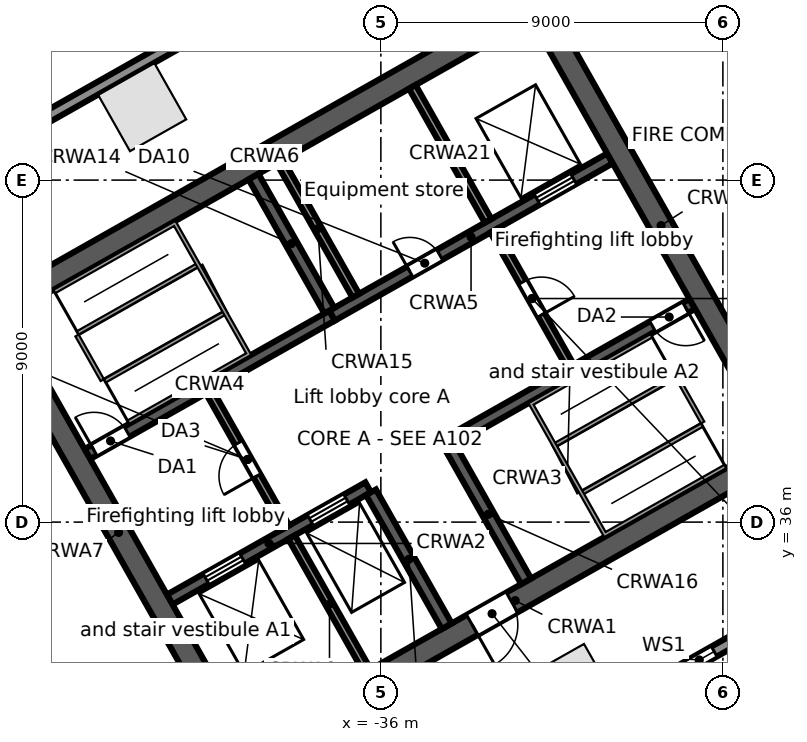
"""IFC4 building model, lengths in metres.
Left out: names, types, materials, properties, quantities, classifications, styles, units other than length and angle.
Written with IfcOpenShell. Run it as: python <this file> out.ifc"""

import sys

from ifc_helpers import new_model, si_unit, direction, frame, frame_2d, origin, origin_2d, place, context, subcontext, project, spatial, rectangle, extrude, element, fill, save


model = new_model("IFC4")
c1 = context("Model", 3, precision=1e-05, world=origin(), true_north=direction((0.0, 1.0)))
c2 = subcontext(c1, "Body", "Model", "MODEL_VIEW")
j1 = project(units=[si_unit("LENGTHUNIT", "METRE"), si_unit("PLANEANGLEUNIT", "RADIAN")], contexts=[c1])
p1 = place(None, origin())
s1 = spatial("IfcSite", under=j1, at=p1, CompositionType="ELEMENT")
p2 = place(p1, origin())
s2 = spatial("IfcBuilding", under=s1, at=p2, CompositionType="ELEMENT")
p3 = place(p2, frame((0.0, 0.0, 51.5)))
s3 = spatial("IfcBuildingStorey", under=s2, at=p3, CompositionType="ELEMENT", Elevation=51.5)
for number, where, z_axis, x_axis in (
    (1, (-42.28, 46.919, 0.0), (0.0, 0.0, 1.0), (-0.87, -0.492, 0.0)),
    (2, (-30.976, 31.635, 0.0), (0.0, 0.0, 1.0), (0.87, 0.492, 0.0)),
):
    element("IfcColumn", number, at=place(p3, frame(where, z_axis=z_axis, x_axis=x_axis)), inside=s3, PredefinedType="COLUMN", context=c2, shape_type="SweptSolid", body=[
        extrude(rectangle(XDim=1.7, YDim=1.7, at=origin_2d()), origin(), (0.0, 0.0, 1.0), 5.0),
    ])
p4 = place(p3, frame((-58.745, 38.764, 0.0), z_axis=(0.0, 0.0, 1.0), x_axis=(0.870355811726, 0.492423355453, 0.0)))
e3 = element("IfcWall", 3, at=p4, inside=s3, PredefinedType="STANDARD", context=c2, shape_type="SweptSolid", body=[
    extrude(rectangle(XDim=64.025, YDim=0.3, at=frame_2d((32.013, 0.0))), origin(), (0.0, 0.0, 1.0), 4.68),
])
p5 = place(p4, frame((60.122, 0.0, 0.6)))
e4 = element("IfcOpeningElement", 4, at=p5, cuts=e3, PredefinedType="OPENING", context=c2, shape_type="SweptSolid", body=[
    extrude(rectangle(XDim=0.9, YDim=3.2, at=frame_2d((0.45, 1.6))), frame((0.0, 0.16, 0.0), z_axis=(0.0, -1.0, 0.0), x_axis=(1.0, 0.0, 0.0)), (0.0, 0.0, 1.0), 0.32),
])
p6 = place(p4, frame((50.992, 0.0, 0.6)))
e5 = element("IfcOpeningElement", 5, at=p6, cuts=e3, PredefinedType="OPENING", context=c2, shape_type="SweptSolid", body=[
    extrude(rectangle(XDim=0.9, YDim=3.2, at=frame_2d((0.45, 1.6))), frame((0.0, 0.16, 0.0), z_axis=(0.0, -1.0, 0.0), x_axis=(1.0, 0.0, 0.0)), (0.0, 0.0, 1.0), 0.32),
])
p7 = place(p4, frame((41.862, 0.0, 0.6)))
e6 = element("IfcOpeningElement", 6, at=p7, cuts=e3, PredefinedType="OPENING", context=c2, shape_type="SweptSolid", body=[
    extrude(rectangle(XDim=0.9, YDim=3.2, at=frame_2d((0.45, 1.6))), frame((0.0, 0.16, 0.0), z_axis=(0.0, -1.0, 0.0), x_axis=(1.0, 0.0, 0.0)), (0.0, 0.0, 1.0), 0.32),
])
p8 = place(p4, frame((32.732, 0.0, 0.6)))
e7 = element("IfcOpeningElement", 7, at=p8, cuts=e3, PredefinedType="OPENING", context=c2, shape_type="SweptSolid", body=[
    extrude(rectangle(XDim=0.9, YDim=3.2, at=frame_2d((0.45, 1.6))), frame((0.0, 0.16, 0.0), z_axis=(0.0, -1.0, 0.0), x_axis=(1.0, 0.0, 0.0)), (0.0, 0.0, 1.0), 0.32),
])
p9 = place(p4, frame((23.602, 0.0, 0.6)))
e8 = element("IfcOpeningElement", 8, at=p9, cuts=e3, PredefinedType="OPENING", context=c2, shape_type="SweptSolid", body=[
    extrude(rectangle(XDim=0.9, YDim=3.2, at=frame_2d((0.45, 1.6))), frame((0.0, 0.16, 0.0), z_axis=(0.0, -1.0, 0.0), x_axis=(1.0, 0.0, 0.0)), (0.0, 0.0, 1.0), 0.32),
])
p10 = place(p4, frame((14.472, 0.0, 0.6)))
e9 = element("IfcOpeningElement", 9, at=p10, cuts=e3, PredefinedType="OPENING", context=c2, shape_type="SweptSolid", body=[
    extrude(rectangle(XDim=0.9, YDim=3.2, at=frame_2d((0.45, 1.6))), frame((0.0, 0.16, 0.0), z_axis=(0.0, -1.0, 0.0), x_axis=(1.0, 0.0, 0.0)), (0.0, 0.0, 1.0), 0.32),
])
p11 = place(p4, frame((5.342, 0.0, 0.6)))
e10 = element("IfcOpeningElement", 10, at=p11, cuts=e3, PredefinedType="OPENING", context=c2, shape_type="SweptSolid", body=[
    extrude(rectangle(XDim=0.9, YDim=3.2, at=frame_2d((0.45, 1.6))), frame((0.0, 0.16, 0.0), z_axis=(0.0, -1.0, 0.0), x_axis=(1.0, 0.0, 0.0)), (0.0, 0.0, 1.0), 0.32),
])
p12 = place(p3, frame((-44.109, 26.504, 0.0), z_axis=(0.0, 0.0, 1.0), x_axis=(-0.857169502585, 0.515034410344, 0.0)))
e11 = element("IfcWall", 11, at=p12, inside=s3, PredefinedType="STANDARD", context=c2, shape_type="SweptSolid", body=[
    extrude(rectangle(XDim=17.127, YDim=0.3, at=frame_2d((8.563, 0.0))), origin(), (0.0, 0.0, 1.0), 4.68),
])
p13 = place(p12, frame((13.403, 0.0, 0.6)))
e12 = element("IfcOpeningElement", 12, at=p13, cuts=e11, PredefinedType="OPENING", context=c2, shape_type="SweptSolid", body=[
    extrude(rectangle(XDim=0.9, YDim=3.2, at=frame_2d((0.45, 1.6))), frame((0.0, 0.16, 0.0), z_axis=(0.0, -1.0, 0.0), x_axis=(1.0, 0.0, 0.0)), (0.0, 0.0, 1.0), 0.32),
])
p14 = place(p12, frame((4.903, 0.0, 0.6)))
e13 = element("IfcOpeningElement", 13, at=p14, cuts=e11, PredefinedType="OPENING", context=c2, shape_type="SweptSolid", body=[
    extrude(rectangle(XDim=0.9, YDim=3.2, at=frame_2d((0.45, 1.6))), frame((0.0, 0.16, 0.0), z_axis=(0.0, -1.0, 0.0), x_axis=(1.0, 0.0, 0.0)), (0.0, 0.0, 1.0), 0.32),
])
p15 = place(p3, frame((-0.055, 47.969, 0.0), z_axis=(0.0, 0.0, 1.0), x_axis=(-0.870355730478, -0.492423499058, 0.0)))
e14 = element("IfcWall", 14, at=p15, inside=s3, PredefinedType="STANDARD", context=c2, shape_type="SweptSolid", body=[
    extrude(rectangle(XDim=43.75, YDim=0.3, at=frame_2d((21.875, 0.0))), origin(), (0.0, 0.0, 1.0), 4.68),
])
p16 = place(p15, frame((39.977, 0.0, 0.6)))
e15 = element("IfcOpeningElement", 15, at=p16, cuts=e14, PredefinedType="OPENING", context=c2, shape_type="SweptSolid", body=[
    extrude(rectangle(XDim=0.9, YDim=3.2, at=frame_2d((0.45, 1.6))), frame((0.0, 0.16, 0.0), z_axis=(0.0, -1.0, 0.0), x_axis=(1.0, 0.0, 0.0)), (0.0, 0.0, 1.0), 0.32),
])
p17 = place(p15, frame((31.222, 0.0, 0.6)))
e16 = element("IfcOpeningElement", 16, at=p17, cuts=e14, PredefinedType="OPENING", context=c2, shape_type="SweptSolid", body=[
    extrude(rectangle(XDim=0.9, YDim=3.2, at=frame_2d((0.45, 1.6))), frame((0.0, 0.16, 0.0), z_axis=(0.0, -1.0, 0.0), x_axis=(1.0, 0.0, 0.0)), (0.0, 0.0, 1.0), 0.32),
])
p18 = place(p15, frame((22.468, 0.0, 0.6)))
e17 = element("IfcOpeningElement", 17, at=p18, cuts=e14, PredefinedType="OPENING", context=c2, shape_type="SweptSolid", body=[
    extrude(rectangle(XDim=0.9, YDim=3.2, at=frame_2d((0.45, 1.6))), frame((0.0, 0.16, 0.0), z_axis=(0.0, -1.0, 0.0), x_axis=(1.0, 0.0, 0.0)), (0.0, 0.0, 1.0), 0.32),
])
p19 = place(p15, frame((13.713, 0.0, 0.6)))
e18 = element("IfcOpeningElement", 18, at=p19, cuts=e14, PredefinedType="OPENING", context=c2, shape_type="SweptSolid", body=[
    extrude(rectangle(XDim=0.9, YDim=3.2, at=frame_2d((0.45, 1.6))), frame((0.0, 0.16, 0.0), z_axis=(0.0, -1.0, 0.0), x_axis=(1.0, 0.0, 0.0)), (0.0, 0.0, 1.0), 0.32),
])
p20 = place(p15, frame((4.959, 0.0, 0.6)))
e19 = element("IfcOpeningElement", 19, at=p20, cuts=e14, PredefinedType="OPENING", context=c2, shape_type="SweptSolid", body=[
    extrude(rectangle(XDim=0.9, YDim=3.2, at=frame_2d((0.45, 1.6))), frame((0.0, 0.16, 0.0), z_axis=(0.0, -1.0, 0.0), x_axis=(1.0, 0.0, 0.0)), (0.0, 0.0, 1.0), 0.32),
])
p21 = place(p3, frame((-39.862, 29.749, 0.0), z_axis=(0.0, 0.0, 1.0), x_axis=(0.870350116061, 0.492433422375, 0.0)))
e20 = element("IfcWall", 20, at=p21, inside=s3, PredefinedType="SOLIDWALL", context=c2, shape_type="SweptSolid", body=[
    extrude(rectangle(XDim=17.0, YDim=0.6, at=frame_2d((8.5, 0.0))), origin(), (0.0, 0.0, 1.0), 4.68),
])
p22 = place(p21, frame((7.2, 0.0, 0.0)))
e21 = element("IfcOpeningElement", 21, at=p22, cuts=e20, PredefinedType="OPENING", context=c2, shape_type="SweptSolid", body=[
    extrude(rectangle(XDim=1.2, YDim=2.1, at=frame_2d((0.6, 1.05))), frame((0.0, 0.31, 0.0), z_axis=(0.0, -1.0, 0.0), x_axis=(1.0, 0.0, 0.0)), (0.0, 0.0, 1.0), 0.62),
])
p23 = place(p3, frame((-41.556, 33.961, 0.0), z_axis=(0.0, 0.0, 1.0), x_axis=(0.870343731308, 0.492444706919, 0.0)))
e22 = element("IfcWall", 22, at=p23, inside=s3, PredefinedType="SOLIDWALL", context=c2, shape_type="SweptSolid", body=[
    extrude(rectangle(XDim=6.0, YDim=0.3, at=frame_2d((3.0, 0.0))), origin(), (0.0, 0.0, 1.0), 4.68),
])
p24 = place(p23, frame((1.1, 0.0, 0.0)))
e23 = element("IfcOpeningElement", 23, at=p24, cuts=e22, PredefinedType="OPENING", context=c2, shape_type="SweptSolid", body=[
    extrude(rectangle(XDim=1.1, YDim=2.1, at=frame_2d((0.55, 1.05))), frame((0.0, 0.16, 0.0), z_axis=(0.0, -1.0, 0.0), x_axis=(1.0, 0.0, 0.0)), (0.0, 0.0, 1.0), 0.32),
])
p25 = place(p23, frame((4.25, 0.0, 0.0)))
e24 = element("IfcOpeningElement", 24, at=p25, cuts=e22, PredefinedType="OPENING", context=c2, shape_type="SweptSolid", body=[
    extrude(rectangle(XDim=1.1, YDim=2.1, at=frame_2d((0.55, 1.05))), frame((0.0, 0.16, 0.0), z_axis=(0.0, -1.0, 0.0), x_axis=(1.0, 0.0, 0.0)), (0.0, 0.0, 1.0), 0.32),
])
p26 = place(p3, frame((-34.245, 38.097, 0.0), z_axis=(0.0, 0.0, 1.0), x_axis=(0.870364910201, 0.492407273597, 0.0)))
e25 = element("IfcWall", 25, at=p26, inside=s3, PredefinedType="SOLIDWALL", context=c2, shape_type="SweptSolid", body=[
    extrude(rectangle(XDim=7.4, YDim=0.3, at=frame_2d((3.7, 0.0))), origin(), (0.0, 0.0, 1.0), 4.68),
])
p27 = place(p26, frame((6.2, 0.0, 0.0)))
e26 = element("IfcOpeningElement", 26, at=p27, cuts=e25, PredefinedType="OPENING", context=c2, shape_type="SweptSolid", body=[
    extrude(rectangle(XDim=1.0, YDim=2.1, at=frame_2d((0.5, 1.05))), frame((0.0, 0.16, 0.0), z_axis=(0.0, -1.0, 0.0), x_axis=(1.0, 0.0, 0.0)), (0.0, 0.0, 1.0), 0.32),
])
p28 = place(p3, frame((-43.723, 37.791, 0.0), z_axis=(0.0, 0.0, 1.0), x_axis=(0.87035077051, 0.49243226567, 0.0)))
e27 = element("IfcWall", 27, at=p28, inside=s3, PredefinedType="SOLIDWALL", context=c2, shape_type="SweptSolid", body=[
    extrude(rectangle(XDim=7.4, YDim=0.3, at=frame_2d((3.7, 0.0))), origin(), (0.0, 0.0, 1.0), 4.68),
])
p29 = place(p28, frame((0.2, 0.0, 0.0)))
e28 = element("IfcOpeningElement", 28, at=p29, cuts=e27, PredefinedType="OPENING", context=c2, shape_type="SweptSolid", body=[
    extrude(rectangle(XDim=1.0, YDim=2.1, at=frame_2d((0.5, 1.05))), frame((0.0, 0.16, 0.0), z_axis=(0.0, -1.0, 0.0), x_axis=(1.0, 0.0, 0.0)), (0.0, 0.0, 1.0), 0.32),
])
p30 = place(p3, frame((-37.282, 41.435, 0.0), z_axis=(0.0, 0.0, 1.0), x_axis=(0.870356516133, 0.492422110414, 0.0)))
e29 = element("IfcWall", 29, at=p30, inside=s3, PredefinedType="SOLIDWALL", context=c2, shape_type="SweptSolid", body=[
    extrude(rectangle(XDim=8.4, YDim=0.3, at=frame_2d((4.2, 0.0))), origin(), (0.0, 0.0, 1.0), 4.68),
])
p31 = place(p30, frame((6.2, 0.0, 0.0)))
e30 = element("IfcOpeningElement", 30, at=p31, cuts=e29, PredefinedType="OPENING", context=c2, shape_type="SweptSolid", body=[
    extrude(rectangle(XDim=1.1, YDim=2.1, at=frame_2d((0.55, 1.05))), frame((0.0, 0.16, 0.0), z_axis=(0.0, -1.0, 0.0), x_axis=(1.0, 0.0, 0.0)), (0.0, 0.0, 1.0), 0.32),
])
p32 = place(p30, frame((2.35, 0.0, 0.0)))
e31 = element("IfcOpeningElement", 31, at=p32, cuts=e29, PredefinedType="OPENING", context=c2, shape_type="SweptSolid", body=[
    extrude(rectangle(XDim=0.9, YDim=2.1, at=frame_2d((0.45, 1.05))), frame((0.0, 0.16, 0.0), z_axis=(0.0, -1.0, 0.0), x_axis=(1.0, 0.0, 0.0)), (0.0, 0.0, 1.0), 0.32),
])
p33 = place(p3, frame((-46.461, 41.412, 0.0), z_axis=(0.0, 0.0, 1.0), x_axis=(0.870350116061, 0.492433422375, 0.0)))
e32 = element("IfcWall", 32, at=p33, inside=s3, PredefinedType="SOLIDWALL", context=c2, shape_type="SweptSolid", body=[
    extrude(rectangle(XDim=17.0, YDim=0.6, at=frame_2d((8.5, 0.0))), origin(), (0.0, 0.0, 1.0), 4.68),
])
p34 = place(p3, frame((-46.052, 41.298, 0.0), z_axis=(0.0, 0.0, 1.0), x_axis=(0.492418598281, -0.870358503186, 0.0)))
e33 = element("IfcWall", 33, at=p34, inside=s3, PredefinedType="SOLIDWALL", context=c2, shape_type="SweptSolid", body=[
    extrude(rectangle(XDim=12.8, YDim=0.6, at=frame_2d((6.4, 0.0))), origin(), (0.0, 0.0, 1.0), 4.68),
])
p35 = place(p3, frame((-38.349, 35.603, 0.0), z_axis=(0.0, 0.0, 1.0), x_axis=(0.49241474071, -0.870360685654, 0.0)))
e34 = element("IfcWall", 34, at=p35, inside=s3, PredefinedType="SOLIDWALL", context=c2, shape_type="SweptSolid", body=[
    extrude(rectangle(XDim=4.05, YDim=0.2, at=frame_2d((2.025, 0.0))), origin(), (0.0, 0.0, 1.0), 4.68),
])
p36 = place(p3, frame((-40.516, 39.433, 0.0), z_axis=(0.0, 0.0, 1.0), x_axis=(0.492453559952, -0.87033872216, 0.0)))
e35 = element("IfcWall", 35, at=p36, inside=s3, PredefinedType="PARTITIONING", context=c2, shape_type="SweptSolid", body=[
    extrude(rectangle(XDim=4.1, YDim=0.2, at=frame_2d((2.05, 0.0))), origin(), (0.0, 0.0, 1.0), 4.68),
])
p37 = place(p36, frame((1.55, 0.0, 0.0)))
e36 = element("IfcOpeningElement", 36, at=p37, cuts=e35, PredefinedType="OPENING", context=c2, shape_type="SweptSolid", body=[
    extrude(rectangle(XDim=1.0, YDim=2.1, at=frame_2d((0.5, 1.05))), frame((0.0, 0.11, 0.0), z_axis=(0.0, -1.0, 0.0), x_axis=(1.0, 0.0, 0.0)), (0.0, 0.0, 1.0), 0.22),
])
p38 = place(p3, frame((-36.26, 36.785, 0.0), z_axis=(0.0, 0.0, 1.0), x_axis=(0.492440575896, -0.870346068648, 0.0)))
e37 = element("IfcWall", 37, at=p38, inside=s3, PredefinedType="SOLIDWALL", context=c2, shape_type="SweptSolid", body=[
    extrude(rectangle(XDim=4.05, YDim=0.3, at=frame_2d((2.025, 0.0))), origin(), (0.0, 0.0, 1.0), 4.68),
])
p39 = place(p3, frame((-39.35, 45.09, 0.0), z_axis=(0.0, 0.0, 1.0), x_axis=(0.49241474071, -0.870360685654, 0.0)))
e38 = element("IfcWall", 38, at=p39, inside=s3, PredefinedType="SOLIDWALL", context=c2, shape_type="SweptSolid", body=[
    extrude(rectangle(XDim=4.05, YDim=0.3, at=frame_2d((2.025, 0.0))), origin(), (0.0, 0.0, 1.0), 4.68),
])
p40 = place(p3, frame((-38.654, 45.484, 0.0), z_axis=(0.0, 0.0, 1.0), x_axis=(0.492440575896, -0.870346068648, 0.0)))
e39 = element("IfcWall", 39, at=p40, inside=s3, PredefinedType="SOLIDWALL", context=c2, shape_type="SweptSolid", body=[
    extrude(rectangle(XDim=4.05, YDim=0.2, at=frame_2d((2.025, 0.0))), origin(), (0.0, 0.0, 1.0), 4.68),
])
p41 = place(p3, frame((-34.171, 37.967, 0.0), z_axis=(0.0, 0.0, 1.0), x_axis=(0.492394910396, -0.870371904542, 0.0)))
e40 = element("IfcWall", 40, at=p41, inside=s3, PredefinedType="SOLIDWALL", context=c2, shape_type="SweptSolid", body=[
    extrude(rectangle(XDim=4.05, YDim=0.3, at=frame_2d((2.025, 0.0))), origin(), (0.0, 0.0, 1.0), 4.68),
])
p42 = place(p3, frame((-33.031, 43.667, 0.0), z_axis=(0.0, 0.0, 1.0), x_axis=(0.492408451753, -0.87036424366, 0.0)))
e41 = element("IfcWall", 41, at=p42, inside=s3, PredefinedType="PARTITIONING", context=c2, shape_type="SweptSolid", body=[
    extrude(rectangle(XDim=4.1, YDim=0.2, at=frame_2d((2.05, 0.0))), origin(), (0.0, 0.0, 1.0), 4.68),
])
p43 = place(p42, frame((1.55, 0.0, 0.0)))
e42 = element("IfcOpeningElement", 42, at=p43, cuts=e41, PredefinedType="OPENING", context=c2, shape_type="SweptSolid", body=[
    extrude(rectangle(XDim=1.0, YDim=2.1, at=frame_2d((0.5, 1.05))), frame((0.0, 0.11, 0.0), z_axis=(0.0, -1.0, 0.0), x_axis=(1.0, 0.0, 0.0)), (0.0, 0.0, 1.0), 0.22),
])
p44 = place(p3, frame((-35.173, 47.454, 0.0), z_axis=(0.0, 0.0, 1.0), x_axis=(0.492440575896, -0.870346068648, 0.0)))
e43 = element("IfcWall", 43, at=p44, inside=s3, PredefinedType="SOLIDWALL", context=c2, shape_type="SweptSolid", body=[
    extrude(rectangle(XDim=4.05, YDim=0.2, at=frame_2d((2.025, 0.0))), origin(), (0.0, 0.0, 1.0), 4.68),
])
p45 = place(p3, frame((-31.778, 49.374, 0.0), z_axis=(0.0, 0.0, 1.0), x_axis=(0.492433046652, -0.870350328641, 0.0)))
e44 = element("IfcWall", 44, at=p45, inside=s3, PredefinedType="SOLIDWALL", context=c2, shape_type="SweptSolid", body=[
    extrude(rectangle(XDim=12.8, YDim=0.6, at=frame_2d((6.4, 0.0))), origin(), (0.0, 0.0, 1.0), 4.68),
])
p46 = place(p17, origin())
e45 = element("IfcWindow", 45, at=p46, inside=s3, PartitioningType="SINGLE_PANEL", PredefinedType="WINDOW", context=c2, shape_type="SweptSolid", body=[
    extrude(rectangle(XDim=0.9, YDim=3.2, at=frame_2d((0.45, 1.6))), frame((0.0, 0.03, 0.0), z_axis=(0.0, -1.0, 0.0), x_axis=(1.0, 0.0, 0.0)), (0.0, 0.0, 1.0), 0.06),
])
fill(e16, e45)
p47 = place(p31, origin())
e46 = element("IfcDoor", 46, at=p47, inside=s3, OperationType="DOUBLE_DOOR_SLIDING", PredefinedType="DOOR", context=c2, shape_type="SweptSolid", body=[
    extrude(rectangle(XDim=1.1, YDim=2.1, at=frame_2d((0.55, 1.05))), frame((0.0, 0.025, 0.0), z_axis=(0.0, -1.0, 0.0), x_axis=(1.0, 0.0, 0.0)), (0.0, 0.0, 1.0), 0.05),
])
fill(e30, e46)
p48 = place(p24, origin())
e47 = element("IfcDoor", 47, at=p48, inside=s3, OperationType="DOUBLE_DOOR_SLIDING", PredefinedType="DOOR", context=c2, shape_type="SweptSolid", body=[
    extrude(rectangle(XDim=1.1, YDim=2.1, at=frame_2d((0.55, 1.05))), frame((0.0, 0.025, 0.0), z_axis=(0.0, -1.0, 0.0), x_axis=(1.0, 0.0, 0.0)), (0.0, 0.0, 1.0), 0.05),
])
fill(e23, e47)
p49 = place(p25, origin())
e48 = element("IfcDoor", 48, at=p49, inside=s3, OperationType="DOUBLE_DOOR_SLIDING", PredefinedType="DOOR", context=c2, shape_type="SweptSolid", body=[
    extrude(rectangle(XDim=1.1, YDim=2.1, at=frame_2d((0.55, 1.05))), frame((0.0, 0.025, 0.0), z_axis=(0.0, -1.0, 0.0), x_axis=(1.0, 0.0, 0.0)), (0.0, 0.0, 1.0), 0.05),
])
fill(e24, e48)
p50 = place(p29, origin())
e49 = element("IfcDoor", 49, at=p50, inside=s3, OperationType="SINGLE_SWING_LEFT", PredefinedType="DOOR", context=c2, shape_type="SweptSolid", body=[
    extrude(rectangle(XDim=1.0, YDim=2.1, at=frame_2d((0.5, 1.05))), frame((0.0, 0.025, 0.0), z_axis=(0.0, -1.0, 0.0), x_axis=(1.0, 0.0, 0.0)), (0.0, 0.0, 1.0), 0.05),
])
fill(e28, e49)
p51 = place(p27, frame((1.0, 0.0, 0.0), z_axis=(0.0, 0.0, 1.0), x_axis=(-1.0, 0.0, 0.0)))
e50 = element("IfcDoor", 50, at=p51, inside=s3, OperationType="SINGLE_SWING_LEFT", PredefinedType="DOOR", context=c2, shape_type="SweptSolid", body=[
    extrude(rectangle(XDim=1.0, YDim=2.1, at=frame_2d((0.5, 1.05))), frame((0.0, 0.025, 0.0), z_axis=(0.0, -1.0, 0.0), x_axis=(1.0, 0.0, 0.0)), (0.0, 0.0, 1.0), 0.05),
])
fill(e26, e50)
p52 = place(p37, frame((1.0, 0.0, 0.0), z_axis=(0.0, 0.0, 1.0), x_axis=(-1.0, 0.0, 0.0)))
e51 = element("IfcDoor", 51, at=p52, inside=s3, OperationType="SINGLE_SWING_LEFT", PredefinedType="DOOR", context=c2, shape_type="SweptSolid", body=[
    extrude(rectangle(XDim=1.0, YDim=2.1, at=frame_2d((0.5, 1.05))), frame((0.0, 0.025, 0.0), z_axis=(0.0, -1.0, 0.0), x_axis=(1.0, 0.0, 0.0)), (0.0, 0.0, 1.0), 0.05),
])
fill(e36, e51)
p53 = place(p43, origin())
e52 = element("IfcDoor", 52, at=p53, inside=s3, OperationType="SINGLE_SWING_RIGHT", PredefinedType="DOOR", context=c2, shape_type="SweptSolid", body=[
    extrude(rectangle(XDim=1.0, YDim=2.1, at=frame_2d((0.5, 1.05))), frame((0.0, 0.025, 0.0), z_axis=(0.0, -1.0, 0.0), x_axis=(1.0, 0.0, 0.0)), (0.0, 0.0, 1.0), 0.05),
])
fill(e42, e52)
p54 = place(p22, frame((1.2, 0.0, 0.0), z_axis=(0.0, 0.0, 1.0), x_axis=(-1.0, 0.0, 0.0)))
e53 = element("IfcDoor", 53, at=p54, inside=s3, OperationType="SINGLE_SWING_RIGHT", PredefinedType="DOOR", context=c2, shape_type="SweptSolid", body=[
    extrude(rectangle(XDim=1.2, YDim=2.1, at=frame_2d((0.6, 1.05))), frame((0.0, 0.025, 0.0), z_axis=(0.0, -1.0, 0.0), x_axis=(1.0, 0.0, 0.0)), (0.0, 0.0, 1.0), 0.05),
])
fill(e21, e53)
p55 = place(p32, origin())
e54 = element("IfcDoor", 54, at=p55, inside=s3, OperationType="SINGLE_SWING_LEFT", PredefinedType="DOOR", context=c2, shape_type="SweptSolid", body=[
    extrude(rectangle(XDim=0.9, YDim=2.1, at=frame_2d((0.45, 1.05))), frame((0.0, 0.025, 0.0), z_axis=(0.0, -1.0, 0.0), x_axis=(1.0, 0.0, 0.0)), (0.0, 0.0, 1.0), 0.05),
])
fill(e31, e54)
save(model, sys.argv[1])
